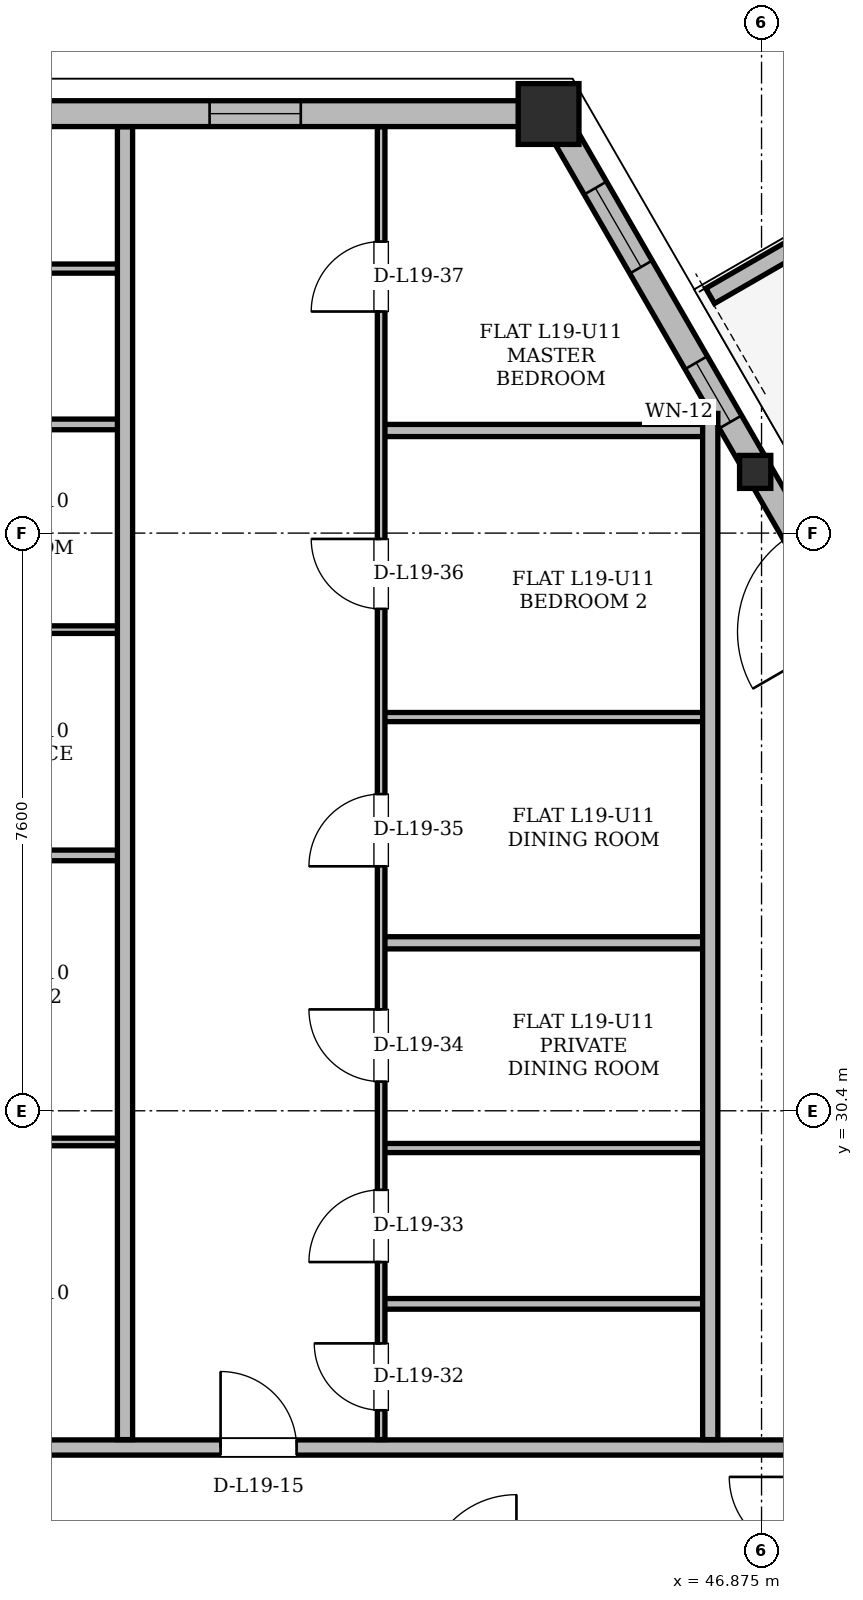
"""IFC4 building model, lengths in metres.
Left out: names, types, materials, properties, quantities, classifications, styles, units other than length and angle.
Written with IfcOpenShell. Run it as: python <this file> out.ifc"""

import sys

from ifc_helpers import new_model, si_unit, direction, frame, frame_2d, origin, origin_2d, place, context, subcontext, project, spatial, polyline, rectangle, hollow_rectangle, i_section, outline, extrude, element, fill, save


model = new_model("IFC4")
c1 = context("Model", 3, precision=1e-05, world=origin(), true_north=direction((0.0, 1.0)))
c2 = subcontext(c1, "Body", "Model", "MODEL_VIEW")
j1 = project(units=[si_unit("LENGTHUNIT", "METRE"), si_unit("PLANEANGLEUNIT", "RADIAN")], contexts=[c1])
p1 = place(None, origin())
s1 = spatial("IfcSite", under=j1, at=p1, CompositionType="ELEMENT")
p2 = place(p1, origin())
s2 = spatial("IfcBuilding", under=s1, at=p2, CompositionType="ELEMENT")
p3 = place(p2, frame((0.0, 0.0, 74.1)))
s3 = spatial("IfcBuildingStorey", under=s2, at=p3, CompositionType="ELEMENT", Elevation=74.1)
p4 = place(p3, frame((44.124, 43.518, 0.004), z_axis=(-0.028338509418, -0.002582406134, 0.999595048038), x_axis=(0.090751072182, -0.995873607893, 0.0)))
e1 = element("IfcColumn", 1, at=p4, inside=s3, PredefinedType="COLUMN", context=c2, shape_type="SweptSolid", body=[
    extrude(hollow_rectangle(XDim=0.8, YDim=0.8, WallThickness=0.065, at=origin_2d()), origin(), (0.0, 0.0, 1.0), 3.593),
])
p5 = place(p3, frame((46.839, 38.816, 0.004), z_axis=(-0.026436687648, -0.005912575387, 0.999633004156), x_axis=(0.218258401472, -0.975891013478, 0.0)))
e2 = element("IfcColumn", 2, at=p5, inside=s3, PredefinedType="COLUMN", context=c2, shape_type="SweptSolid", body=[
    extrude(i_section(OverallWidth=0.411, OverallDepth=0.434, WebThickness=0.036, FlangeThickness=0.057, at=origin_2d()), origin(), (0.0, 0.0, 1.0), 3.592),
])
p6 = place(p3, frame((61.093, 14.127, 0.0), z_axis=(0.0, 0.0, 1.0), x_axis=(-0.500000596145, 0.8660250596, 0.0)))
e3 = element("IfcWall", 3, at=p6, inside=s3, PredefinedType="SOLIDWALL", context=c2, shape_type="SweptSolid", body=[
    extrude(rectangle(XDim=33.938, YDim=0.34, at=frame_2d((16.969, 0.0))), origin(), (0.0, 0.0, 1.0), 2.474),
])
p7 = place(p6, frame((7.824, 0.0, 0.0)))
e4 = element("IfcOpeningElement", 4, at=p7, cuts=e3, PredefinedType="OPENING", context=c2, shape_type="SweptSolid", body=[
    extrude(rectangle(XDim=1.5, YDim=2.2, at=frame_2d((0.75, 1.1))), frame((0.0, 0.17, 0.0), z_axis=(0.0, -1.0, 0.0), x_axis=(1.0, 0.0, 0.0)), (0.0, 0.0, 1.0), 0.34),
])
p8 = place(p6, frame((26.069, 0.0, 0.0)))
e5 = element("IfcOpeningElement", 5, at=p8, cuts=e3, PredefinedType="OPENING", context=c2, shape_type="SweptSolid", body=[
    extrude(rectangle(XDim=1.5, YDim=2.2, at=frame_2d((0.75, 1.1))), frame((0.0, 0.17, 0.0), z_axis=(0.0, -1.0, 0.0), x_axis=(1.0, 0.0, 0.0)), (0.0, 0.0, 1.0), 0.34),
])
p9 = place(p6, frame((1.47, 0.0, 0.85)))
e6 = element("IfcOpeningElement", 6, at=p9, cuts=e3, PredefinedType="OPENING", context=c2, shape_type="SweptSolid", body=[
    extrude(rectangle(XDim=2.2, YDim=1.514, at=frame_2d((1.1, 0.757))), frame((0.0, 0.17, 0.0), z_axis=(0.0, -1.0, 0.0), x_axis=(1.0, 0.0, 0.0)), (0.0, 0.0, 1.0), 0.34),
])
p10 = place(p6, frame((31.608, 0.0, 0.85)))
e7 = element("IfcOpeningElement", 7, at=p10, cuts=e3, PredefinedType="OPENING", context=c2, shape_type="SweptSolid", body=[
    extrude(rectangle(XDim=1.2, YDim=1.474, at=frame_2d((0.6, 0.737))), frame((0.0, 0.17, 0.0), z_axis=(0.0, -1.0, 0.0), x_axis=(1.0, 0.0, 0.0)), (0.0, 0.0, 1.0), 0.34),
])
p11 = place(p6, frame((20.038, 0.0, 0.85)))
e8 = element("IfcOpeningElement", 8, at=p11, cuts=e3, PredefinedType="OPENING", context=c2, shape_type="SweptSolid", body=[
    extrude(rectangle(XDim=2.4, YDim=1.514, at=frame_2d((1.2, 0.757))), frame((0.0, 0.17, 0.0), z_axis=(0.0, -1.0, 0.0), x_axis=(1.0, 0.0, 0.0)), (0.0, 0.0, 1.0), 0.34),
])
p12 = place(p6, frame((15.034, 0.0, 0.85)))
e9 = element("IfcOpeningElement", 9, at=p12, cuts=e3, PredefinedType="OPENING", context=c2, shape_type="SweptSolid", body=[
    extrude(rectangle(XDim=1.2, YDim=1.474, at=frame_2d((0.6, 0.737))), frame((0.0, 0.17, 0.0), z_axis=(0.0, -1.0, 0.0), x_axis=(1.0, 0.0, 0.0)), (0.0, 0.0, 1.0), 0.34),
])
p13 = place(p6, frame((17.375, 0.0, 0.85)))
e10 = element("IfcOpeningElement", 10, at=p13, cuts=e3, PredefinedType="OPENING", context=c2, shape_type="SweptSolid", body=[
    extrude(rectangle(XDim=1.4, YDim=1.514, at=frame_2d((0.7, 0.757))), frame((0.0, 0.17, 0.0), z_axis=(0.0, -1.0, 0.0), x_axis=(1.0, 0.0, 0.0)), (0.0, 0.0, 1.0), 0.34),
])
p14 = place(p6, frame((29.255, 0.0, 0.85)))
e11 = element("IfcOpeningElement", 11, at=p14, cuts=e3, PredefinedType="OPENING", context=c2, shape_type="SweptSolid", body=[
    extrude(rectangle(XDim=0.9, YDim=1.15, at=frame_2d((0.45, 0.575))), frame((0.0, 0.17, 0.0), z_axis=(0.0, -1.0, 0.0), x_axis=(1.0, 0.0, 0.0)), (0.0, 0.0, 1.0), 0.34),
])
p15 = place(p3, frame((44.124, 43.518, 0.0), z_axis=(0.0, 0.0, 1.0), x_axis=(-1.0, 0.0, 0.0)))
e12 = element("IfcWall", 12, at=p15, inside=s3, PredefinedType="SOLIDWALL", context=c2, shape_type="SweptSolid", body=[
    extrude(rectangle(XDim=13.248, YDim=0.34, at=frame_2d((6.624, 0.0))), origin(), (0.0, 0.0, 1.0), 2.474),
])
p16 = place(p15, frame((3.311, 0.0, 0.85)))
e13 = element("IfcOpeningElement", 13, at=p16, cuts=e12, PredefinedType="OPENING", context=c2, shape_type="SweptSolid", body=[
    extrude(rectangle(XDim=1.2, YDim=1.48, at=frame_2d((0.6, 0.74))), frame((0.0, 0.17, 0.0), z_axis=(0.0, -1.0, 0.0), x_axis=(1.0, 0.0, 0.0)), (0.0, 0.0, 1.0), 0.34),
])
p17 = place(p3, frame((46.199, 41.12, 0.0), z_axis=(0.0, 0.0, 1.0), x_axis=(0.866012356593, 0.500022597718, 0.0)))
e14 = element("IfcWall", 14, at=p17, inside=s3, PredefinedType="PARAPET", context=c2, shape_type="SweptSolid", body=[
    extrude(outline(polyline([(0.0, 0.0), (2.042, 0.0), (2.042, 1.1), (0.0, 1.32), (0.0, 0.0)])), frame((0.0, 0.115, 0.0), z_axis=(0.0, -1.0, 0.0), x_axis=(1.0, 0.0, 0.0)), (0.0, 0.0, 1.0), 0.23),
])
p18 = place(p3, frame((27.55, 25.97, 0.0), z_axis=(0.0, 0.0, 1.0), x_axis=(1.0, 0.0, 0.0)))
e15 = element("IfcWall", 15, at=p18, inside=s3, PredefinedType="PARTITIONING", context=c2, shape_type="SweptSolid", body=[
    extrude(rectangle(XDim=19.9, YDim=0.2, at=frame_2d((9.95, 0.0))), origin(), (0.0, 0.0, 1.0), 2.718),
])
p19 = place(p18, frame((0.425, 0.0, 0.0)))
e16 = element("IfcOpeningElement", 16, at=p19, cuts=e15, PredefinedType="OPENING", context=c2, shape_type="SweptSolid", body=[
    extrude(rectangle(XDim=1.0, YDim=2.18, at=frame_2d((0.5, 1.09))), frame((0.0, 0.1, 0.0), z_axis=(0.0, -1.0, 0.0), x_axis=(1.0, 0.0, 0.0)), (0.0, 0.0, 1.0), 0.2),
])
p20 = place(p18, frame((4.347, 0.0, 0.0)))
e17 = element("IfcOpeningElement", 17, at=p20, cuts=e15, PredefinedType="OPENING", context=c2, shape_type="SweptSolid", body=[
    extrude(rectangle(XDim=1.0, YDim=2.18, at=frame_2d((0.5, 1.09))), frame((0.0, 0.1, 0.0), z_axis=(0.0, -1.0, 0.0), x_axis=(1.0, 0.0, 0.0)), (0.0, 0.0, 1.0), 0.2),
])
p21 = place(p18, frame((12.208, 0.0, 0.0)))
e18 = element("IfcOpeningElement", 18, at=p21, cuts=e15, PredefinedType="OPENING", context=c2, shape_type="SweptSolid", body=[
    extrude(rectangle(XDim=1.0, YDim=2.18, at=frame_2d((0.5, 1.09))), frame((0.0, 0.1, 0.0), z_axis=(0.0, -1.0, 0.0), x_axis=(1.0, 0.0, 0.0)), (0.0, 0.0, 1.0), 0.2),
])
p22 = place(p3, frame((41.87, 27.86, 0.0), z_axis=(0.0, 0.0, 1.0), x_axis=(1.0, 0.0, 0.0)))
e19 = element("IfcWall", 19, at=p22, inside=s3, PredefinedType="PARTITIONING", context=c2, shape_type="SweptSolid", body=[
    extrude(rectangle(XDim=4.38, YDim=0.14, at=frame_2d((2.19, 0.0))), origin(), (0.0, 0.0, 1.0), 2.718),
])
p23 = place(p3, frame((41.87, 29.91, 0.0), z_axis=(0.0, 0.0, 1.0), x_axis=(1.0, 0.0, 0.0)))
e20 = element("IfcWall", 20, at=p23, inside=s3, PredefinedType="PARTITIONING", context=c2, shape_type="SweptSolid", body=[
    extrude(rectangle(XDim=4.38, YDim=0.12, at=frame_2d((2.19, 0.0))), origin(), (0.0, 0.0, 1.0), 2.718),
])
p24 = place(p3, frame((34.15, 29.99, 0.0), z_axis=(0.0, 0.0, 1.0), x_axis=(1.0, 0.0, 0.0)))
e21 = element("IfcWall", 21, at=p24, inside=s3, PredefinedType="PARTITIONING", context=c2, shape_type="SweptSolid", body=[
    extrude(rectangle(XDim=4.4, YDim=0.1, at=frame_2d((2.2, 0.0))), origin(), (0.0, 0.0, 1.0), 3.34),
])
p25 = place(p3, frame((41.87, 32.61, 0.0), z_axis=(0.0, 0.0, 1.0), x_axis=(1.0, 0.0, 0.0)))
e22 = element("IfcWall", 22, at=p25, inside=s3, PredefinedType="PARTITIONING", context=c2, shape_type="SweptSolid", body=[
    extrude(rectangle(XDim=4.38, YDim=0.16, at=frame_2d((2.19, 0.0))), origin(), (0.0, 0.0, 1.0), 2.718),
])
p26 = place(p3, frame((34.15, 33.76, 0.0), z_axis=(0.0, 0.0, 1.0), x_axis=(1.0, 0.0, 0.0)))
e23 = element("IfcWall", 23, at=p26, inside=s3, PredefinedType="PARTITIONING", context=c2, shape_type="SweptSolid", body=[
    extrude(rectangle(XDim=4.4, YDim=0.14, at=frame_2d((2.2, 0.0))), origin(), (0.0, 0.0, 1.0), 3.34),
])
p27 = place(p3, frame((41.87, 35.58, 0.0), z_axis=(0.0, 0.0, 1.0), x_axis=(1.0, 0.0, 0.0)))
e24 = element("IfcWall", 24, at=p27, inside=s3, PredefinedType="PARTITIONING", context=c2, shape_type="SweptSolid", body=[
    extrude(rectangle(XDim=4.38, YDim=0.12, at=frame_2d((2.19, 0.0))), origin(), (0.0, 0.0, 1.0), 2.718),
])
p28 = place(p3, frame((34.15, 36.73, 0.0), z_axis=(0.0, 0.0, 1.0), x_axis=(1.0, 0.0, 0.0)))
e25 = element("IfcWall", 25, at=p28, inside=s3, PredefinedType="PARTITIONING", context=c2, shape_type="SweptSolid", body=[
    extrude(rectangle(XDim=4.4, YDim=0.1, at=frame_2d((2.2, 0.0))), origin(), (0.0, 0.0, 1.0), 3.34),
])
p29 = place(p3, frame((41.87, 39.35, 0.0), z_axis=(0.0, 0.0, 1.0), x_axis=(1.0, 0.0, 0.0)))
e26 = element("IfcWall", 26, at=p29, inside=s3, PredefinedType="PARTITIONING", context=c2, shape_type="SweptSolid", body=[
    extrude(rectangle(XDim=4.38, YDim=0.16, at=frame_2d((2.19, 0.0))), origin(), (0.0, 0.0, 1.0), 2.718),
])
p30 = place(p3, frame((34.15, 39.43, 0.0), z_axis=(0.0, 0.0, 1.0), x_axis=(1.0, 0.0, 0.0)))
e27 = element("IfcWall", 27, at=p30, inside=s3, PredefinedType="PARTITIONING", context=c2, shape_type="SweptSolid", body=[
    extrude(rectangle(XDim=4.4, YDim=0.14, at=frame_2d((2.2, 0.0))), origin(), (0.0, 0.0, 1.0), 3.34),
])
p31 = place(p3, frame((34.15, 41.48, 0.0), z_axis=(0.0, 0.0, 1.0), x_axis=(1.0, 0.0, 0.0)))
e28 = element("IfcWall", 28, at=p31, inside=s3, PredefinedType="PARTITIONING", context=c2, shape_type="SweptSolid", body=[
    extrude(rectangle(XDim=4.4, YDim=0.12, at=frame_2d((2.2, 0.0))), origin(), (0.0, 0.0, 1.0), 3.34),
])
p32 = place(p3, frame((38.5, 26.074, 0.0), z_axis=(0.0, 0.0, 1.0), x_axis=(0.0, 1.0, 0.0)))
e29 = element("IfcWall", 29, at=p32, inside=s3, PredefinedType="PARTITIONING", context=c2, shape_type="SweptSolid", body=[
    extrude(rectangle(XDim=17.271, YDim=0.2, at=frame_2d((8.635, 0.0))), origin(), (0.0, 0.0, 1.0), 3.34),
])
p33 = place(p3, frame((41.87, 26.074, 0.0), z_axis=(0.0, 0.0, 1.0), x_axis=(0.0, 1.0, 0.0)))
e30 = element("IfcWall", 30, at=p33, inside=s3, PredefinedType="PARTITIONING", context=c2, shape_type="SweptSolid", body=[
    extrude(rectangle(XDim=17.271, YDim=0.1, at=frame_2d((8.635, 0.0))), origin(), (0.0, 0.0, 1.0), 3.34),
])
p34 = place(p33, frame((0.386, 0.0, 0.0)))
e31 = element("IfcOpeningElement", 31, at=p34, cuts=e30, PredefinedType="OPENING", context=c2, shape_type="SweptSolid", body=[
    extrude(rectangle(XDim=0.88, YDim=2.08, at=frame_2d((0.44, 1.04))), frame((0.0, 0.05, 0.0), z_axis=(0.0, -1.0, 0.0), x_axis=(1.0, 0.0, 0.0)), (0.0, 0.0, 1.0), 0.1),
])
p35 = place(p33, frame((2.336, 0.0, 0.0)))
e32 = element("IfcOpeningElement", 32, at=p35, cuts=e30, PredefinedType="OPENING", context=c2, shape_type="SweptSolid", body=[
    extrude(rectangle(XDim=0.95, YDim=2.1, at=frame_2d((0.475, 1.05))), frame((0.0, 0.05, 0.0), z_axis=(0.0, -1.0, 0.0), x_axis=(1.0, 0.0, 0.0)), (0.0, 0.0, 1.0), 0.1),
])
p36 = place(p33, frame((4.71, 0.0, 0.0)))
e33 = element("IfcOpeningElement", 33, at=p36, cuts=e30, PredefinedType="OPENING", context=c2, shape_type="SweptSolid", body=[
    extrude(rectangle(XDim=0.95, YDim=2.1, at=frame_2d((0.475, 1.05))), frame((0.0, 0.05, 0.0), z_axis=(0.0, -1.0, 0.0), x_axis=(1.0, 0.0, 0.0)), (0.0, 0.0, 1.0), 0.1),
])
p37 = place(p33, frame((7.542, 0.0, 0.0)))
e34 = element("IfcOpeningElement", 34, at=p37, cuts=e30, PredefinedType="OPENING", context=c2, shape_type="SweptSolid", body=[
    extrude(rectangle(XDim=0.95, YDim=2.1, at=frame_2d((0.475, 1.05))), frame((0.0, 0.05, 0.0), z_axis=(0.0, -1.0, 0.0), x_axis=(1.0, 0.0, 0.0)), (0.0, 0.0, 1.0), 0.1),
])
p38 = place(p33, frame((10.929, 0.0, 0.0)))
e35 = element("IfcOpeningElement", 35, at=p38, cuts=e30, PredefinedType="OPENING", context=c2, shape_type="SweptSolid", body=[
    extrude(rectangle(XDim=0.92, YDim=2.12, at=frame_2d((0.46, 1.06))), frame((0.0, 0.05, 0.0), z_axis=(0.0, -1.0, 0.0), x_axis=(1.0, 0.0, 0.0)), (0.0, 0.0, 1.0), 0.1),
])
p39 = place(p33, frame((14.841, 0.0, 0.0)))
e36 = element("IfcOpeningElement", 36, at=p39, cuts=e30, PredefinedType="OPENING", context=c2, shape_type="SweptSolid", body=[
    extrude(rectangle(XDim=0.92, YDim=2.12, at=frame_2d((0.46, 1.06))), frame((0.0, 0.05, 0.0), z_axis=(0.0, -1.0, 0.0), x_axis=(1.0, 0.0, 0.0)), (0.0, 0.0, 1.0), 0.1),
])
p40 = place(p3, frame((46.2, 26.074, 0.0), z_axis=(0.0, 0.0, 1.0), x_axis=(0.0, 1.0, 0.0)))
e37 = element("IfcWall", 37, at=p40, inside=s3, PredefinedType="PARTITIONING", context=c2, shape_type="SweptSolid", body=[
    extrude(rectangle(XDim=13.5, YDim=0.2, at=frame_2d((6.75, 0.0))), origin(), (0.0, 0.0, 1.0), 2.474),
])
p41 = place(p10, origin())
e38 = element("IfcWindow", 38, at=p41, inside=s3, PartitioningType="SINGLE_PANEL", PredefinedType="WINDOW", context=c2, shape_type="SweptSolid", body=[
    extrude(rectangle(XDim=1.2, YDim=1.474, at=frame_2d((0.6, 0.737))), frame((0.0, 0.03, 0.0), z_axis=(0.0, -1.0, 0.0), x_axis=(1.0, 0.0, 0.0)), (0.0, 0.0, 1.0), 0.06),
])
fill(e7, e38)
p42 = place(p16, origin())
e39 = element("IfcWindow", 39, at=p42, inside=s3, PartitioningType="SINGLE_PANEL", PredefinedType="WINDOW", context=c2, shape_type="SweptSolid", body=[
    extrude(rectangle(XDim=1.2, YDim=1.48, at=frame_2d((0.6, 0.74))), frame((0.0, 0.03, 0.0), z_axis=(0.0, -1.0, 0.0), x_axis=(1.0, 0.0, 0.0)), (0.0, 0.0, 1.0), 0.06),
])
fill(e13, e39)
p43 = place(p14, origin())
e40 = element("IfcWindow", 40, at=p43, inside=s3, PartitioningType="SINGLE_PANEL", PredefinedType="WINDOW", context=c2, shape_type="SweptSolid", body=[
    extrude(rectangle(XDim=0.9, YDim=1.15, at=frame_2d((0.45, 0.575))), frame((0.0, 0.03, 0.0), z_axis=(0.0, -1.0, 0.0), x_axis=(1.0, 0.0, 0.0)), (0.0, 0.0, 1.0), 0.06),
])
fill(e11, e40)
p44 = place(p21, origin())
e41 = element("IfcDoor", 41, at=p44, inside=s3, OperationType="SINGLE_SWING_LEFT", PredefinedType="DOOR", context=c2, shape_type="SweptSolid", body=[
    extrude(rectangle(XDim=1.0, YDim=2.18, at=frame_2d((0.5, 1.09))), frame((0.0, 0.025, 0.0), z_axis=(0.0, -1.0, 0.0), x_axis=(1.0, 0.0, 0.0)), (0.0, 0.0, 1.0), 0.05),
])
fill(e18, e41)
p45 = place(p34, origin())
e42 = element("IfcDoor", 42, at=p45, inside=s3, OperationType="SINGLE_SWING_RIGHT", PredefinedType="DOOR", context=c2, shape_type="SweptSolid", body=[
    extrude(rectangle(XDim=0.88, YDim=2.08, at=frame_2d((0.44, 1.04))), frame((0.0, 0.025, 0.0), z_axis=(0.0, -1.0, 0.0), x_axis=(1.0, 0.0, 0.0)), (0.0, 0.0, 1.0), 0.05),
])
fill(e31, e42)
p46 = place(p35, origin())
e43 = element("IfcDoor", 43, at=p46, inside=s3, OperationType="SINGLE_SWING_LEFT", PredefinedType="DOOR", context=c2, shape_type="SweptSolid", body=[
    extrude(rectangle(XDim=0.95, YDim=2.1, at=frame_2d((0.475, 1.05))), frame((0.0, 0.025, 0.0), z_axis=(0.0, -1.0, 0.0), x_axis=(1.0, 0.0, 0.0)), (0.0, 0.0, 1.0), 0.05),
])
fill(e32, e43)
p47 = place(p36, origin())
e44 = element("IfcDoor", 44, at=p47, inside=s3, OperationType="SINGLE_SWING_RIGHT", PredefinedType="DOOR", context=c2, shape_type="SweptSolid", body=[
    extrude(rectangle(XDim=0.95, YDim=2.1, at=frame_2d((0.475, 1.05))), frame((0.0, 0.025, 0.0), z_axis=(0.0, -1.0, 0.0), x_axis=(1.0, 0.0, 0.0)), (0.0, 0.0, 1.0), 0.05),
])
fill(e33, e44)
p48 = place(p37, origin())
e45 = element("IfcDoor", 45, at=p48, inside=s3, OperationType="SINGLE_SWING_LEFT", PredefinedType="DOOR", context=c2, shape_type="SweptSolid", body=[
    extrude(rectangle(XDim=0.95, YDim=2.1, at=frame_2d((0.475, 1.05))), frame((0.0, 0.025, 0.0), z_axis=(0.0, -1.0, 0.0), x_axis=(1.0, 0.0, 0.0)), (0.0, 0.0, 1.0), 0.05),
])
fill(e34, e45)
p49 = place(p38, origin())
e46 = element("IfcDoor", 46, at=p49, inside=s3, OperationType="SINGLE_SWING_RIGHT", PredefinedType="DOOR", context=c2, shape_type="SweptSolid", body=[
    extrude(rectangle(XDim=0.92, YDim=2.12, at=frame_2d((0.46, 1.06))), frame((0.0, 0.025, 0.0), z_axis=(0.0, -1.0, 0.0), x_axis=(1.0, 0.0, 0.0)), (0.0, 0.0, 1.0), 0.05),
])
fill(e35, e46)
p50 = place(p39, origin())
e47 = element("IfcDoor", 47, at=p50, inside=s3, OperationType="SINGLE_SWING_LEFT", PredefinedType="DOOR", context=c2, shape_type="SweptSolid", body=[
    extrude(rectangle(XDim=0.92, YDim=2.12, at=frame_2d((0.46, 1.06))), frame((0.0, 0.025, 0.0), z_axis=(0.0, -1.0, 0.0), x_axis=(1.0, 0.0, 0.0)), (0.0, 0.0, 1.0), 0.05),
])
fill(e36, e47)
save(model, sys.argv[1])
